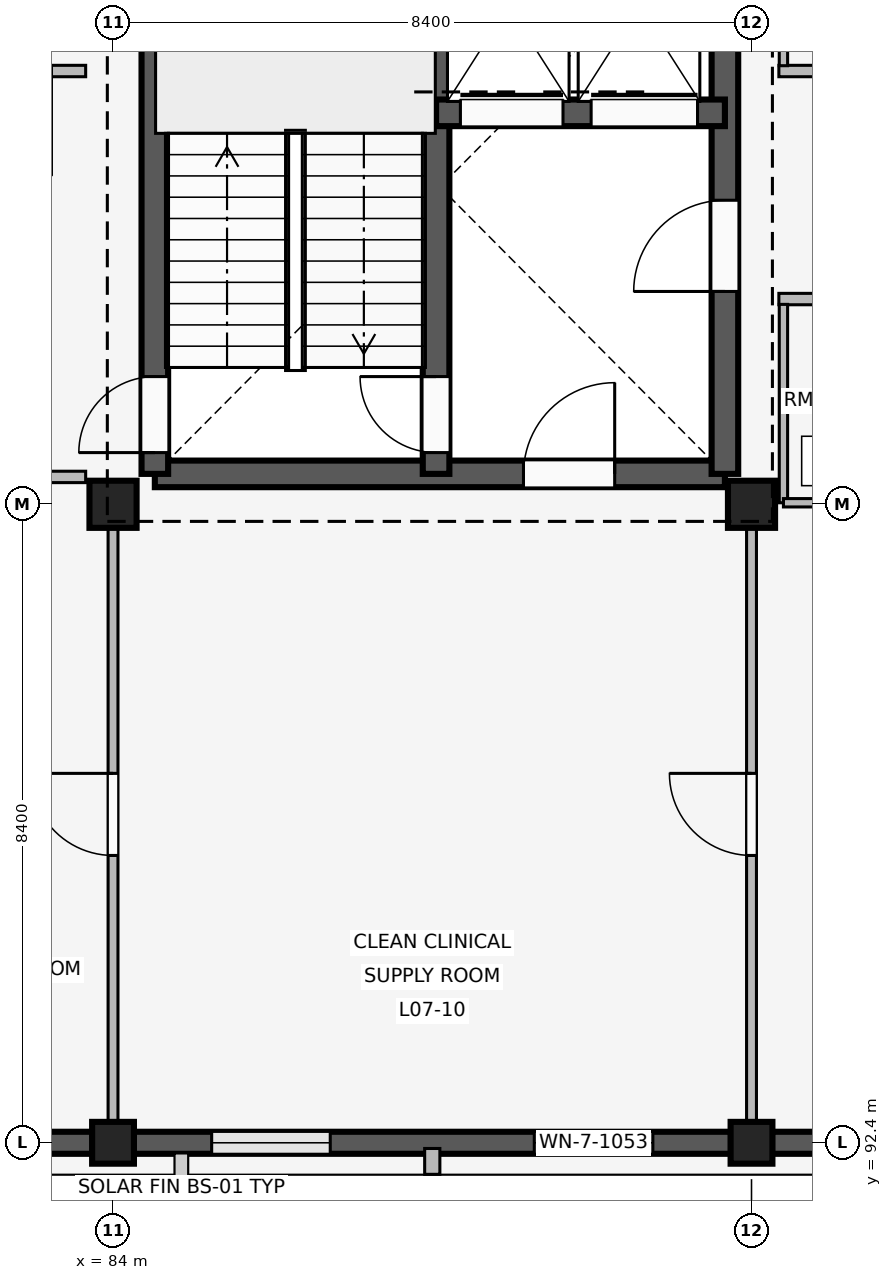
"""IFC4 building model, lengths in metres.
Left out: names, types, materials, properties, quantities, classifications, styles, units other than length and angle.
Written with IfcOpenShell. Run it as: python <this file> out.ifc"""

import sys

from ifc_helpers import new_model, si_unit, direction, frame, frame_2d, origin, origin_2d, place, context, subcontext, project, spatial, rectangle, extrude, element, fill, save


model = new_model("IFC4")
c1 = context("Model", 3, precision=1e-05, world=origin(), true_north=direction((0.0, 1.0)))
c2 = subcontext(c1, "Body", "Model", "MODEL_VIEW")
j1 = project(units=[si_unit("LENGTHUNIT", "METRE"), si_unit("PLANEANGLEUNIT", "RADIAN")], contexts=[c1])
p1 = place(None, origin())
s1 = spatial("IfcSite", under=j1, at=p1, CompositionType="ELEMENT")
p2 = place(p1, origin())
s2 = spatial("IfcBuilding", under=s1, at=p2, CompositionType="ELEMENT")
p3 = place(p2, frame((0.0, 0.0, 28.8)))
s3 = spatial("IfcBuildingStorey", under=s2, at=p3, CompositionType="ELEMENT", Elevation=28.8)
p4 = place(p3, frame((84.0, 92.4, 0.0), z_axis=(0.0, 0.0, 1.0), x_axis=(1.0, 0.0, 0.0)))
e1 = element("IfcColumn", 1, at=p4, inside=s3, PredefinedType="COLUMN", context=c2, shape_type="SweptSolid", body=[
    extrude(rectangle(XDim=0.55, YDim=0.55, at=origin_2d()), origin(), (0.0, 0.0, 1.0), 4.2),
])
p5 = place(p3, frame((84.0, 100.8, 0.0), z_axis=(0.0, 0.0, 1.0), x_axis=(1.0, 0.0, 0.0)))
e2 = element("IfcColumn", 2, at=p5, inside=s3, PredefinedType="COLUMN", context=c2, shape_type="SweptSolid", body=[
    extrude(rectangle(XDim=0.62, YDim=0.62, at=origin_2d()), origin(), (0.0, 0.0, 1.0), 4.2),
])
p6 = place(p3, frame((92.4, 92.4, 0.0), z_axis=(0.0, 0.0, 1.0), x_axis=(1.0, 0.0, 0.0)))
e3 = element("IfcColumn", 3, at=p6, inside=s3, PredefinedType="COLUMN", context=c2, shape_type="SweptSolid", body=[
    extrude(rectangle(XDim=0.55, YDim=0.55, at=origin_2d()), origin(), (0.0, 0.0, 1.0), 4.2),
])
p7 = place(p3, frame((92.4, 100.8, 0.0), z_axis=(0.0, 0.0, 1.0), x_axis=(1.0, 0.0, 0.0)))
e4 = element("IfcColumn", 4, at=p7, inside=s3, PredefinedType="COLUMN", context=c2, shape_type="SweptSolid", body=[
    extrude(rectangle(XDim=0.62, YDim=0.62, at=origin_2d()), origin(), (0.0, 0.0, 1.0), 4.2),
])
p8 = place(p3, frame((83.73, 92.4, 0.0), z_axis=(0.0, 0.0, 1.0), x_axis=(-1.0, 0.0, 0.0)))
e5 = element("IfcWall", 5, at=p8, inside=s3, PredefinedType="SOLIDWALL", context=c2, shape_type="SweptSolid", body=[
    extrude(rectangle(XDim=7.86, YDim=0.29, at=frame_2d((3.93, 0.0))), origin(), (0.0, 0.0, 1.0), 3.34),
])
p9 = place(p8, frame((0.645, 0.0, 0.85)))
e6 = element("IfcOpeningElement", 6, at=p9, cuts=e5, PredefinedType="OPENING", context=c2, shape_type="SweptSolid", body=[
    extrude(rectangle(XDim=1.38, YDim=1.5, at=frame_2d((0.69, 0.75))), frame((0.0, 0.155, 0.0), z_axis=(0.0, -1.0, 0.0), x_axis=(1.0, 0.0, 0.0)), (0.0, 0.0, 1.0), 0.31),
])
p10 = place(p8, frame((5.362, 0.0, 0.85)))
e7 = element("IfcOpeningElement", 7, at=p10, cuts=e5, PredefinedType="OPENING", context=c2, shape_type="SweptSolid", body=[
    extrude(rectangle(XDim=1.38, YDim=1.5, at=frame_2d((0.69, 0.75))), frame((0.0, 0.155, 0.0), z_axis=(0.0, -1.0, 0.0), x_axis=(1.0, 0.0, 0.0)), (0.0, 0.0, 1.0), 0.31),
])
p11 = place(p3, frame((92.13, 92.4, 0.0), z_axis=(0.0, 0.0, 1.0), x_axis=(-1.0, 0.0, 0.0)))
e8 = element("IfcWall", 8, at=p11, inside=s3, PredefinedType="SOLIDWALL", context=c2, shape_type="SweptSolid", body=[
    extrude(rectangle(XDim=7.86, YDim=0.29, at=frame_2d((3.93, 0.0))), origin(), (0.0, 0.0, 1.0), 3.34),
])
p12 = place(p11, frame((1.028, 0.0, 0.85)))
e9 = element("IfcOpeningElement", 9, at=p12, cuts=e8, PredefinedType="OPENING", context=c2, shape_type="SweptSolid", body=[
    extrude(rectangle(XDim=1.56, YDim=1.7, at=frame_2d((0.78, 0.85))), frame((0.0, 0.155, 0.0), z_axis=(0.0, -1.0, 0.0), x_axis=(1.0, 0.0, 0.0)), (0.0, 0.0, 1.0), 0.31),
])
p13 = place(p11, frame((5.272, 0.0, 0.85)))
e10 = element("IfcOpeningElement", 10, at=p13, cuts=e8, PredefinedType="OPENING", context=c2, shape_type="SweptSolid", body=[
    extrude(rectangle(XDim=1.56, YDim=1.7, at=frame_2d((0.78, 0.85))), frame((0.0, 0.155, 0.0), z_axis=(0.0, -1.0, 0.0), x_axis=(1.0, 0.0, 0.0)), (0.0, 0.0, 1.0), 0.31),
])
p14 = place(p3, frame((88.2, 92.325, 0.0), z_axis=(0.0, 0.0, 1.0), x_axis=(0.0, -1.0, 0.0)))
e11 = element("IfcWall", 11, at=p14, inside=s3, PredefinedType="ELEMENTEDWALL", context=c2, shape_type="SweptSolid", body=[
    extrude(rectangle(XDim=0.34, YDim=0.2, at=frame_2d((0.17, 0.0))), origin(), (0.0, 0.0, 1.0), 3.32),
])
p15 = place(p3, frame((100.53, 92.4, 0.0), z_axis=(0.0, 0.0, 1.0), x_axis=(-1.0, 0.0, 0.0)))
e12 = element("IfcWall", 12, at=p15, inside=s3, PredefinedType="SOLIDWALL", context=c2, shape_type="SweptSolid", body=[
    extrude(rectangle(XDim=7.86, YDim=0.29, at=frame_2d((3.93, 0.0))), origin(), (0.0, 0.0, 1.0), 3.34),
])
p16 = place(p15, frame((0.998, 0.0, 0.85)))
e13 = element("IfcOpeningElement", 13, at=p16, cuts=e12, PredefinedType="OPENING", context=c2, shape_type="SweptSolid", body=[
    extrude(rectangle(XDim=1.62, YDim=1.8, at=frame_2d((0.81, 0.9))), frame((0.0, 0.155, 0.0), z_axis=(0.0, -1.0, 0.0), x_axis=(1.0, 0.0, 0.0)), (0.0, 0.0, 1.0), 0.31),
])
p17 = place(p15, frame((5.242, 0.0, 0.85)))
e14 = element("IfcOpeningElement", 14, at=p17, cuts=e12, PredefinedType="OPENING", context=c2, shape_type="SweptSolid", body=[
    extrude(rectangle(XDim=1.62, YDim=1.8, at=frame_2d((0.81, 0.9))), frame((0.0, 0.155, 0.0), z_axis=(0.0, -1.0, 0.0), x_axis=(1.0, 0.0, 0.0)), (0.0, 0.0, 1.0), 0.31),
])
p18 = place(p3, frame((84.55, 101.2, 0.0), z_axis=(0.0, 0.0, 1.0), x_axis=(1.0, 0.0, 0.0)))
e15 = element("IfcWall", 15, at=p18, inside=s3, PredefinedType="SHEAR", context=c2, shape_type="SweptSolid", body=[
    extrude(rectangle(XDim=7.5, YDim=0.35, at=frame_2d((3.75, 0.0))), origin(), (0.0, 0.0, 1.0), 3.94),
])
p19 = place(p18, frame((4.85, 0.0, 0.0)))
e16 = element("IfcOpeningElement", 16, at=p19, cuts=e15, PredefinedType="OPENING", context=c2, shape_type="SweptSolid", body=[
    extrude(rectangle(XDim=1.2, YDim=2.2, at=frame_2d((0.6, 1.1))), frame((0.0, 0.185, 0.0), z_axis=(0.0, -1.0, 0.0), x_axis=(1.0, 0.0, 0.0)), (0.0, 0.0, 1.0), 0.37),
])
p20 = place(p3, frame((84.55, 101.2, 0.0), z_axis=(0.0, 0.0, 1.0), x_axis=(0.0, 1.0, 0.0)))
e17 = element("IfcWall", 17, at=p20, inside=s3, PredefinedType="SHEAR", context=c2, shape_type="SweptSolid", body=[
    extrude(rectangle(XDim=7.55, YDim=0.35, at=frame_2d((3.775, 0.0))), origin(), (0.0, 0.0, 1.0), 3.94),
])
p21 = place(p20, frame((0.28, 0.0, 0.0)))
e18 = element("IfcOpeningElement", 18, at=p21, cuts=e17, PredefinedType="OPENING", context=c2, shape_type="SweptSolid", body=[
    extrude(rectangle(XDim=1.0, YDim=2.15, at=frame_2d((0.5, 1.075))), frame((0.0, 0.185, 0.0), z_axis=(0.0, -1.0, 0.0), x_axis=(1.0, 0.0, 0.0)), (0.0, 0.0, 1.0), 0.37),
])
p22 = place(p3, frame((92.05, 101.2, 0.0), z_axis=(0.0, 0.0, 1.0), x_axis=(0.0, 1.0, 0.0)))
e19 = element("IfcWall", 19, at=p22, inside=s3, PredefinedType="SHEAR", context=c2, shape_type="SweptSolid", body=[
    extrude(rectangle(XDim=7.55, YDim=0.35, at=frame_2d((3.775, 0.0))), origin(), (0.0, 0.0, 1.0), 3.94),
])
p23 = place(p22, frame((2.4, 0.0, 0.0)))
e20 = element("IfcOpeningElement", 20, at=p23, cuts=e19, PredefinedType="OPENING", context=c2, shape_type="SweptSolid", body=[
    extrude(rectangle(XDim=1.2, YDim=2.2, at=frame_2d((0.6, 1.1))), frame((0.0, 0.185, 0.0), z_axis=(0.0, -1.0, 0.0), x_axis=(1.0, 0.0, 0.0)), (0.0, 0.0, 1.0), 0.37),
])
p24 = place(p3, frame((88.25, 101.2, 0.0), z_axis=(0.0, 0.0, 1.0), x_axis=(0.0, 1.0, 0.0)))
e21 = element("IfcWall", 21, at=p24, inside=s3, PredefinedType="SHEAR", context=c2, shape_type="SweptSolid", body=[
    extrude(rectangle(XDim=7.55, YDim=0.35, at=frame_2d((3.775, 0.0))), origin(), (0.0, 0.0, 1.0), 3.94),
])
p25 = place(p24, frame((0.28, 0.0, 0.0)))
e22 = element("IfcOpeningElement", 22, at=p25, cuts=e21, PredefinedType="OPENING", context=c2, shape_type="SweptSolid", body=[
    extrude(rectangle(XDim=1.0, YDim=2.15, at=frame_2d((0.5, 1.075))), frame((0.0, 0.185, 0.0), z_axis=(0.0, -1.0, 0.0), x_axis=(1.0, 0.0, 0.0)), (0.0, 0.0, 1.0), 0.37),
])
p26 = place(p3, frame((88.25, 105.95, 0.0), z_axis=(0.0, 0.0, 1.0), x_axis=(1.0, 0.0, 0.0)))
e23 = element("IfcWall", 23, at=p26, inside=s3, PredefinedType="SHEAR", context=c2, shape_type="SweptSolid", body=[
    extrude(rectangle(XDim=3.8, YDim=0.35, at=frame_2d((1.9, 0.0))), origin(), (0.0, 0.0, 1.0), 3.94),
])
p27 = place(p26, frame((0.32, 0.0, 0.0)))
e24 = element("IfcOpeningElement", 24, at=p27, cuts=e23, PredefinedType="OPENING", context=c2, shape_type="SweptSolid", body=[
    extrude(rectangle(XDim=1.35, YDim=2.25, at=frame_2d((0.675, 1.125))), frame((0.0, 0.185, 0.0), z_axis=(0.0, -1.0, 0.0), x_axis=(1.0, 0.0, 0.0)), (0.0, 0.0, 1.0), 0.37),
])
p28 = place(p26, frame((2.04, 0.0, 0.0)))
e25 = element("IfcOpeningElement", 25, at=p28, cuts=e23, PredefinedType="OPENING", context=c2, shape_type="SweptSolid", body=[
    extrude(rectangle(XDim=1.4, YDim=2.25, at=frame_2d((0.7, 1.125))), frame((0.0, 0.185, 0.0), z_axis=(0.0, -1.0, 0.0), x_axis=(1.0, 0.0, 0.0)), (0.0, 0.0, 1.0), 0.37),
])
p29 = place(p3, frame((81.46, 101.16, 0.0), z_axis=(0.0, 0.0, 1.0), x_axis=(1.0, 0.0, 0.0)))
e26 = element("IfcWall", 26, at=p29, inside=s3, PredefinedType="PARTITIONING", context=c2, shape_type="SweptSolid", body=[
    extrude(rectangle(XDim=2.18, YDim=0.15, at=frame_2d((1.09, 0.0))), origin(), (0.0, 0.0, 1.0), 3.32),
])
p30 = place(p29, frame((0.5, 0.0, 0.0)))
e27 = element("IfcOpeningElement", 27, at=p30, cuts=e26, PredefinedType="OPENING", context=c2, shape_type="SweptSolid", body=[
    extrude(rectangle(XDim=1.08, YDim=2.15, at=frame_2d((0.54, 1.075))), frame((0.0, 0.085, 0.0), z_axis=(0.0, -1.0, 0.0), x_axis=(1.0, 0.0, 0.0)), (0.0, 0.0, 1.0), 0.17),
])
p31 = place(p3, frame((83.64, 106.5, 0.0), z_axis=(0.0, 0.0, 1.0), x_axis=(-1.0, 0.0, 0.0)))
e28 = element("IfcWall", 28, at=p31, inside=s3, PredefinedType="PARTITIONING", context=c2, shape_type="SweptSolid", body=[
    extrude(rectangle(XDim=7.96, YDim=0.15, at=frame_2d((3.98, 0.0))), origin(), (0.0, 0.0, 1.0), 3.32),
])
p32 = place(p31, frame((0.45, 0.0, 0.0)))
e29 = element("IfcOpeningElement", 29, at=p32, cuts=e28, PredefinedType="OPENING", context=c2, shape_type="SweptSolid", body=[
    extrude(rectangle(XDim=1.38, YDim=2.25, at=frame_2d((0.69, 1.125))), frame((0.0, 0.085, 0.0), z_axis=(0.0, -1.0, 0.0), x_axis=(1.0, 0.0, 0.0)), (0.0, 0.0, 1.0), 0.17),
])
p33 = place(p31, frame((4.15, 0.0, 0.0)))
e30 = element("IfcOpeningElement", 30, at=p33, cuts=e28, PredefinedType="OPENING", context=c2, shape_type="SweptSolid", body=[
    extrude(rectangle(XDim=1.38, YDim=2.25, at=frame_2d((0.69, 1.125))), frame((0.0, 0.085, 0.0), z_axis=(0.0, -1.0, 0.0), x_axis=(1.0, 0.0, 0.0)), (0.0, 0.0, 1.0), 0.17),
])
p34 = place(p3, frame((84.0, 92.54, 0.0), z_axis=(0.0, 0.0, 1.0), x_axis=(0.0, 1.0, 0.0)))
e31 = element("IfcWall", 31, at=p34, inside=s3, PredefinedType="PARTITIONING", context=c2, shape_type="SweptSolid", body=[
    extrude(rectangle(XDim=8.21, YDim=0.13, at=frame_2d((4.105, 0.0))), origin(), (0.0, 0.0, 1.0), 3.32),
])
p35 = place(p34, frame((3.64, 0.0, 0.0)))
e32 = element("IfcOpeningElement", 32, at=p35, cuts=e31, PredefinedType="OPENING", context=c2, shape_type="SweptSolid", body=[
    extrude(rectangle(XDim=1.08, YDim=2.15, at=frame_2d((0.54, 1.075))), frame((0.0, 0.075, 0.0), z_axis=(0.0, -1.0, 0.0), x_axis=(1.0, 0.0, 0.0)), (0.0, 0.0, 1.0), 0.15),
])
p36 = place(p3, frame((92.4, 92.54, 0.0), z_axis=(0.0, 0.0, 1.0), x_axis=(0.0, 1.0, 0.0)))
e33 = element("IfcWall", 33, at=p36, inside=s3, PredefinedType="PARTITIONING", context=c2, shape_type="SweptSolid", body=[
    extrude(rectangle(XDim=8.21, YDim=0.13, at=frame_2d((4.105, 0.0))), origin(), (0.0, 0.0, 1.0), 3.32),
])
p37 = place(p36, frame((3.64, 0.0, 0.0)))
e34 = element("IfcOpeningElement", 34, at=p37, cuts=e33, PredefinedType="OPENING", context=c2, shape_type="SweptSolid", body=[
    extrude(rectangle(XDim=1.08, YDim=2.15, at=frame_2d((0.54, 1.075))), frame((0.0, 0.075, 0.0), z_axis=(0.0, -1.0, 0.0), x_axis=(1.0, 0.0, 0.0)), (0.0, 0.0, 1.0), 0.15),
])
p38 = place(p3, frame((92.76, 103.5, 0.0), z_axis=(0.0, 0.0, 1.0), x_axis=(1.0, 0.0, 0.0)))
e35 = element("IfcWall", 35, at=p38, inside=s3, PredefinedType="PARTITIONING", context=c2, shape_type="SweptSolid", body=[
    extrude(rectangle(XDim=7.96, YDim=0.15, at=frame_2d((3.98, 0.0))), origin(), (0.0, 0.0, 1.0), 3.32),
])
p39 = place(p38, frame((2.25, 0.0, 0.0)))
e36 = element("IfcOpeningElement", 36, at=p39, cuts=e35, PredefinedType="OPENING", context=c2, shape_type="SweptSolid", body=[
    extrude(rectangle(XDim=1.38, YDim=2.25, at=frame_2d((0.69, 1.125))), frame((0.0, 0.085, 0.0), z_axis=(0.0, -1.0, 0.0), x_axis=(1.0, 0.0, 0.0)), (0.0, 0.0, 1.0), 0.17),
])
p40 = place(p38, frame((5.95, 0.0, 0.0)))
e37 = element("IfcOpeningElement", 37, at=p40, cuts=e35, PredefinedType="OPENING", context=c2, shape_type="SweptSolid", body=[
    extrude(rectangle(XDim=1.38, YDim=2.25, at=frame_2d((0.69, 1.125))), frame((0.0, 0.085, 0.0), z_axis=(0.0, -1.0, 0.0), x_axis=(1.0, 0.0, 0.0)), (0.0, 0.0, 1.0), 0.17),
])
p41 = place(p3, frame((92.82, 100.82, 0.0), z_axis=(0.0, 0.0, 1.0), x_axis=(0.0, 1.0, 0.0)))
e38 = element("IfcWall", 38, at=p41, inside=s3, PredefinedType="PARTITIONING", context=c2, shape_type="SweptSolid", body=[
    extrude(rectangle(XDim=2.61, YDim=0.11, at=frame_2d((1.305, 0.0))), origin(), (0.0, 0.0, 1.0), 3.32),
])
p42 = place(p3, frame((92.82, 100.82, 0.0), z_axis=(0.0, 0.0, 1.0), x_axis=(1.0, 0.0, 0.0)))
e39 = element("IfcWall", 39, at=p42, inside=s3, PredefinedType="PARTITIONING", context=c2, shape_type="SweptSolid", body=[
    extrude(rectangle(XDim=1.98, YDim=0.11, at=frame_2d((0.99, 0.0))), origin(), (0.0, 0.0, 1.0), 3.32),
])
p43 = place(p42, frame((0.54, 0.0, 0.0)))
e40 = element("IfcOpeningElement", 40, at=p43, cuts=e39, PredefinedType="OPENING", context=c2, shape_type="SweptSolid", body=[
    extrude(rectangle(XDim=0.9, YDim=2.1, at=frame_2d((0.45, 1.05))), frame((0.0, 0.065, 0.0), z_axis=(0.0, -1.0, 0.0), x_axis=(1.0, 0.0, 0.0)), (0.0, 0.0, 1.0), 0.13),
])
p44 = place(p3, frame((100.72, 106.5, 0.0), z_axis=(0.0, 0.0, 1.0), x_axis=(-1.0, 0.0, 0.0)))
e41 = element("IfcWall", 41, at=p44, inside=s3, PredefinedType="PARTITIONING", context=c2, shape_type="SweptSolid", body=[
    extrude(rectangle(XDim=7.96, YDim=0.15, at=frame_2d((3.98, 0.0))), origin(), (0.0, 0.0, 1.0), 3.32),
])
p45 = place(p44, frame((0.73, 0.0, 0.0)))
e42 = element("IfcOpeningElement", 42, at=p45, cuts=e41, PredefinedType="OPENING", context=c2, shape_type="SweptSolid", body=[
    extrude(rectangle(XDim=1.38, YDim=2.25, at=frame_2d((0.69, 1.125))), frame((0.0, 0.085, 0.0), z_axis=(0.0, -1.0, 0.0), x_axis=(1.0, 0.0, 0.0)), (0.0, 0.0, 1.0), 0.17),
])
p46 = place(p44, frame((4.43, 0.0, 0.0)))
e43 = element("IfcOpeningElement", 43, at=p46, cuts=e41, PredefinedType="OPENING", context=c2, shape_type="SweptSolid", body=[
    extrude(rectangle(XDim=1.38, YDim=2.25, at=frame_2d((0.69, 1.125))), frame((0.0, 0.085, 0.0), z_axis=(0.0, -1.0, 0.0), x_axis=(1.0, 0.0, 0.0)), (0.0, 0.0, 1.0), 0.17),
])
p47 = place(p3, frame((92.82, 106.57, 0.0), z_axis=(0.0, 0.0, 1.0), x_axis=(0.0, 1.0, 0.0)))
e44 = element("IfcWall", 44, at=p47, inside=s3, PredefinedType="PARTITIONING", context=c2, shape_type="SweptSolid", body=[
    extrude(rectangle(XDim=2.61, YDim=0.11, at=frame_2d((1.305, 0.0))), origin(), (0.0, 0.0, 1.0), 3.32),
])
p48 = place(p12, origin())
e45 = element("IfcWindow", 45, at=p48, inside=s3, PartitioningType="SINGLE_PANEL", PredefinedType="WINDOW", context=c2, shape_type="SweptSolid", body=[
    extrude(rectangle(XDim=1.56, YDim=1.7, at=frame_2d((0.78, 0.85))), frame((0.0, 0.03, 0.0), z_axis=(0.0, -1.0, 0.0), x_axis=(1.0, 0.0, 0.0)), (0.0, 0.0, 1.0), 0.06),
])
fill(e9, e45)
p49 = place(p13, origin())
e46 = element("IfcWindow", 46, at=p49, inside=s3, PartitioningType="SINGLE_PANEL", PredefinedType="WINDOW", context=c2, shape_type="SweptSolid", body=[
    extrude(rectangle(XDim=1.56, YDim=1.7, at=frame_2d((0.78, 0.85))), frame((0.0, 0.03, 0.0), z_axis=(0.0, -1.0, 0.0), x_axis=(1.0, 0.0, 0.0)), (0.0, 0.0, 1.0), 0.06),
])
fill(e10, e46)
p50 = place(p23, origin())
e47 = element("IfcDoor", 47, at=p50, inside=s3, OperationType="SINGLE_SWING_LEFT", PredefinedType="DOOR", context=c2, shape_type="SweptSolid", body=[
    extrude(rectangle(XDim=1.2, YDim=2.2, at=frame_2d((0.6, 1.1))), frame((0.0, 0.025, 0.0), z_axis=(0.0, -1.0, 0.0), x_axis=(1.0, 0.0, 0.0)), (0.0, 0.0, 1.0), 0.05),
])
fill(e20, e47)
p51 = place(p19, origin())
e48 = element("IfcDoor", 48, at=p51, inside=s3, OperationType="SINGLE_SWING_RIGHT", PredefinedType="DOOR", context=c2, shape_type="SweptSolid", body=[
    extrude(rectangle(XDim=1.2, YDim=2.2, at=frame_2d((0.6, 1.1))), frame((0.0, 0.025, 0.0), z_axis=(0.0, -1.0, 0.0), x_axis=(1.0, 0.0, 0.0)), (0.0, 0.0, 1.0), 0.05),
])
fill(e16, e48)
p52 = place(p21, origin())
e49 = element("IfcDoor", 49, at=p52, inside=s3, OperationType="SINGLE_SWING_LEFT", PredefinedType="DOOR", context=c2, shape_type="SweptSolid", body=[
    extrude(rectangle(XDim=1.0, YDim=2.15, at=frame_2d((0.5, 1.075))), frame((0.0, 0.025, 0.0), z_axis=(0.0, -1.0, 0.0), x_axis=(1.0, 0.0, 0.0)), (0.0, 0.0, 1.0), 0.05),
])
fill(e18, e49)
p53 = place(p25, origin())
e50 = element("IfcDoor", 50, at=p53, inside=s3, OperationType="SINGLE_SWING_RIGHT", PredefinedType="DOOR", context=c2, shape_type="SweptSolid", body=[
    extrude(rectangle(XDim=1.0, YDim=2.15, at=frame_2d((0.5, 1.075))), frame((0.0, 0.025, 0.0), z_axis=(0.0, -1.0, 0.0), x_axis=(1.0, 0.0, 0.0)), (0.0, 0.0, 1.0), 0.05),
])
fill(e22, e50)
p54 = place(p27, origin())
e51 = element("IfcDoor", 51, at=p54, inside=s3, OperationType="SLIDING_TO_LEFT", PredefinedType="DOOR", context=c2, shape_type="SweptSolid", body=[
    extrude(rectangle(XDim=1.35, YDim=2.25, at=frame_2d((0.675, 1.125))), frame((0.0, 0.025, 0.0), z_axis=(0.0, -1.0, 0.0), x_axis=(1.0, 0.0, 0.0)), (0.0, 0.0, 1.0), 0.05),
])
fill(e24, e51)
p55 = place(p28, origin())
e52 = element("IfcDoor", 52, at=p55, inside=s3, OperationType="SLIDING_TO_LEFT", PredefinedType="DOOR", context=c2, shape_type="SweptSolid", body=[
    extrude(rectangle(XDim=1.4, YDim=2.25, at=frame_2d((0.7, 1.125))), frame((0.0, 0.025, 0.0), z_axis=(0.0, -1.0, 0.0), x_axis=(1.0, 0.0, 0.0)), (0.0, 0.0, 1.0), 0.05),
])
fill(e25, e52)
p56 = place(p35, origin())
e53 = element("IfcDoor", 53, at=p56, inside=s3, OperationType="SINGLE_SWING_RIGHT", PredefinedType="DOOR", context=c2, shape_type="SweptSolid", body=[
    extrude(rectangle(XDim=1.08, YDim=2.15, at=frame_2d((0.54, 1.075))), frame((0.0, 0.025, 0.0), z_axis=(0.0, -1.0, 0.0), x_axis=(1.0, 0.0, 0.0)), (0.0, 0.0, 1.0), 0.05),
])
fill(e32, e53)
p57 = place(p37, origin())
e54 = element("IfcDoor", 54, at=p57, inside=s3, OperationType="SINGLE_SWING_RIGHT", PredefinedType="DOOR", context=c2, shape_type="SweptSolid", body=[
    extrude(rectangle(XDim=1.08, YDim=2.15, at=frame_2d((0.54, 1.075))), frame((0.0, 0.025, 0.0), z_axis=(0.0, -1.0, 0.0), x_axis=(1.0, 0.0, 0.0)), (0.0, 0.0, 1.0), 0.05),
])
fill(e34, e54)
save(model, sys.argv[1])
